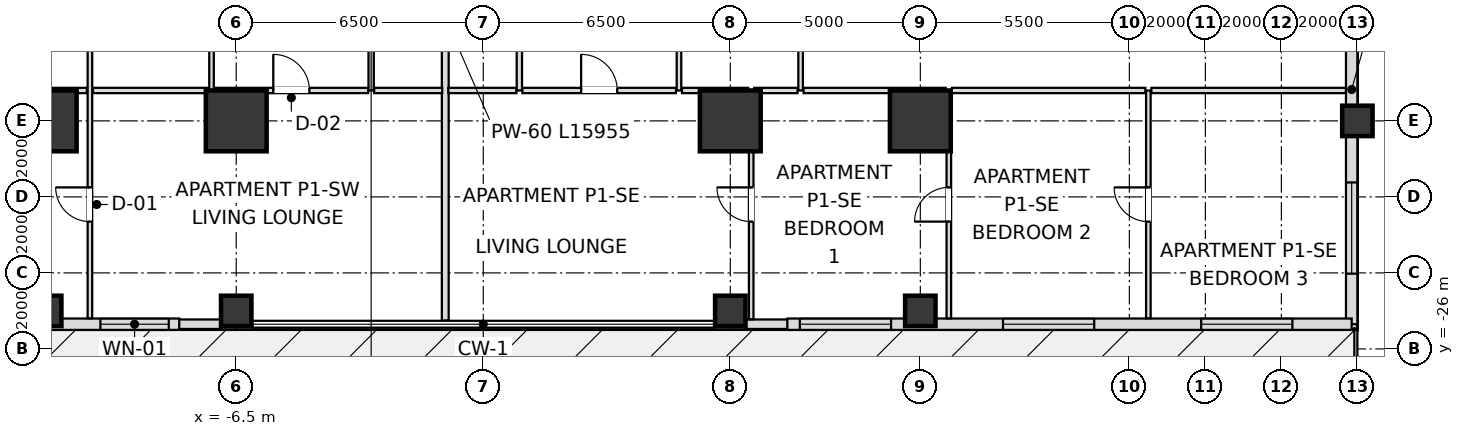
"""IFC4 building model, lengths in metres.
Left out: names, types, materials, properties, quantities, classifications, styles, units other than length and angle.
Written with IfcOpenShell. Run it as: python <this file> out.ifc"""

import sys

from ifc_helpers import new_model, si_unit, direction, frame, frame_2d, origin, origin_2d, place, context, subcontext, project, spatial, rectangle, extrude, element, fill, save


model = new_model("IFC4")
c1 = context("Model", 3, precision=1e-05, world=origin(), true_north=direction((0.0, 1.0)))
c2 = subcontext(c1, "Body", "Model", "MODEL_VIEW")
j1 = project(units=[si_unit("LENGTHUNIT", "METRE"), si_unit("PLANEANGLEUNIT", "RADIAN")], contexts=[c1])
p1 = place(None, origin())
s1 = spatial("IfcSite", under=j1, at=p1, CompositionType="ELEMENT")
p2 = place(p1, origin())
s2 = spatial("IfcBuilding", under=s1, at=p2, CompositionType="ELEMENT")
p3 = place(p2, frame((0.0, 0.0, 6.0)))
s3 = spatial("IfcBuildingStorey", under=s2, at=p3, CompositionType="ELEMENT", Elevation=6.0)
for number, where, z_axis, x_axis in (
    (1, (-11.5, -20.0, 0.0), (0.0, 0.0, 1.0), (1.0, 0.0, 0.0)),
    (2, (-6.5, -20.0, 0.0), (0.0, 0.0, 1.0), (1.0, 0.0, 0.0)),
    (3, (6.5, -20.0, 0.0), (0.0, 0.0, 1.0), (1.0, 0.0, 0.0)),
    (4, (11.5, -20.0, 0.0), (0.0, 0.0, 1.0), (1.0, 0.0, 0.0)),
):
    element("IfcColumn", number, at=place(p3, frame(where, z_axis=z_axis, x_axis=x_axis)), inside=s3, PredefinedType="USERDEFINED", context=c2, shape_type="SweptSolid", body=[
        extrude(rectangle(XDim=1.6, YDim=1.6, at=origin_2d()), origin(), (0.0, 0.0, 1.0), 5.4),
    ])
for number, where, z_axis, x_axis in (
    (5, (23.0, -20.0, 0.0), (0.0, 0.0, 1.0), (1.0, 0.0, 0.0)),
    (6, (-11.5, -25.0, 0.0), (0.0, 0.0, 1.0), (1.0, 0.0, 0.0)),
    (7, (-6.5, -25.0, 0.0), (0.0, 0.0, 1.0), (1.0, 0.0, 0.0)),
    (8, (6.5, -25.0, 0.0), (0.0, 0.0, 1.0), (1.0, 0.0, 0.0)),
    (9, (11.5, -25.0, 0.0), (0.0, 0.0, 1.0), (1.0, 0.0, 0.0)),
):
    element("IfcColumn", number, at=place(p3, frame(where, z_axis=z_axis, x_axis=x_axis)), inside=s3, PredefinedType="COLUMN", context=c2, shape_type="SweptSolid", body=[
        extrude(rectangle(XDim=0.8, YDim=0.8, at=origin_2d()), origin(), (0.0, 0.0, 1.0), 5.4),
    ])
p4 = place(p3, frame((22.85, -13.0, 0.0), z_axis=(0.0, 0.0, 1.0), x_axis=(0.0, -1.0, 0.0)))
e10 = element("IfcWall", 10, at=p4, inside=s3, PredefinedType="SOLIDWALL", context=c2, shape_type="SweptSolid", body=[
    extrude(rectangle(XDim=12.35, YDim=0.3, at=frame_2d((6.175, 0.0))), origin(), (0.0, 0.0, 1.0), 4.476),
])
p5 = place(p4, frame((2.12, 0.0, 0.8)))
e11 = element("IfcOpeningElement", 11, at=p5, cuts=e10, PredefinedType="OPENING", context=c2, shape_type="SweptSolid", body=[
    extrude(rectangle(XDim=2.4, YDim=2.2, at=frame_2d((1.2, 1.1))), frame((0.0, 0.16, 0.0), z_axis=(0.0, -1.0, 0.0), x_axis=(1.0, 0.0, 0.0)), (0.0, 0.0, 1.0), 0.32),
])
p6 = place(p4, frame((8.62, 0.0, 0.8)))
e12 = element("IfcOpeningElement", 12, at=p6, cuts=e10, PredefinedType="OPENING", context=c2, shape_type="SweptSolid", body=[
    extrude(rectangle(XDim=2.4, YDim=2.2, at=frame_2d((1.2, 1.1))), frame((0.0, 0.16, 0.0), z_axis=(0.0, -1.0, 0.0), x_axis=(1.0, 0.0, 0.0)), (0.0, 0.0, 1.0), 0.32),
])
for number, where, z_axis, x_axis in (
    (13, (-8.025, -25.35, 0.0), (0.0, 0.0, 1.0), (1.0, 0.0, 0.0)),
    (14, (6.895, -25.35, 0.0), (0.0, 0.0, 1.0), (1.0, 0.0, 0.0)),
):
    element("IfcWall", number, at=place(p3, frame(where, z_axis=z_axis, x_axis=x_axis)), inside=s3, PredefinedType="SOLIDWALL", context=c2, shape_type="SweptSolid", body=[
        extrude(rectangle(XDim=1.13, YDim=0.25, at=frame_2d((0.565, 0.0))), origin(), (0.0, 0.0, 1.0), 4.476),
    ])
p7 = place(p3, frame((-8.0, -25.35, 0.0), z_axis=(0.0, 0.0, 1.0), x_axis=(-1.0, 0.0, 0.0)))
e15 = element("IfcWall", 15, at=p7, inside=s3, PredefinedType="SOLIDWALL", context=c2, shape_type="SweptSolid", body=[
    extrude(rectangle(XDim=14.85, YDim=0.3, at=frame_2d((7.425, 0.0))), origin(), (0.0, 0.0, 1.0), 4.476),
])
p8 = place(p7, frame((6.8, 0.0, 0.0)))
e16 = element("IfcOpeningElement", 16, at=p8, cuts=e15, PredefinedType="OPENING", context=c2, shape_type="SweptSolid", body=[
    extrude(rectangle(XDim=1.8, YDim=2.3, at=frame_2d((0.9, 1.15))), frame((0.0, 0.16, 0.0), z_axis=(0.0, -1.0, 0.0), x_axis=(1.0, 0.0, 0.0)), (0.0, 0.0, 1.0), 0.32),
])
p9 = place(p7, frame((0.275, 0.0, 0.72)))
e17 = element("IfcOpeningElement", 17, at=p9, cuts=e15, PredefinedType="OPENING", context=c2, shape_type="SweptSolid", body=[
    extrude(rectangle(XDim=1.8, YDim=1.68, at=frame_2d((0.9, 0.84))), frame((0.0, 0.16, 0.0), z_axis=(0.0, -1.0, 0.0), x_axis=(1.0, 0.0, 0.0)), (0.0, 0.0, 1.0), 0.32),
])
p10 = place(p7, frame((4.305, 0.0, 0.72)))
e18 = element("IfcOpeningElement", 18, at=p10, cuts=e15, PredefinedType="OPENING", context=c2, shape_type="SweptSolid", body=[
    extrude(rectangle(XDim=1.8, YDim=1.68, at=frame_2d((0.9, 0.84))), frame((0.0, 0.16, 0.0), z_axis=(0.0, -1.0, 0.0), x_axis=(1.0, 0.0, 0.0)), (0.0, 0.0, 1.0), 0.32),
])
p11 = place(p7, frame((9.065, 0.0, 0.72)))
e19 = element("IfcOpeningElement", 19, at=p11, cuts=e15, PredefinedType="OPENING", context=c2, shape_type="SweptSolid", body=[
    extrude(rectangle(XDim=1.2, YDim=1.68, at=frame_2d((0.6, 0.84))), frame((0.0, 0.16, 0.0), z_axis=(0.0, -1.0, 0.0), x_axis=(1.0, 0.0, 0.0)), (0.0, 0.0, 1.0), 0.32),
])
p12 = place(p7, frame((11.445, 0.0, 0.8)))
e20 = element("IfcOpeningElement", 20, at=p12, cuts=e15, PredefinedType="OPENING", context=c2, shape_type="SweptSolid", body=[
    extrude(rectangle(XDim=2.4, YDim=2.2, at=frame_2d((1.2, 1.1))), frame((0.0, 0.16, 0.0), z_axis=(0.0, -1.0, 0.0), x_axis=(1.0, 0.0, 0.0)), (0.0, 0.0, 1.0), 0.32),
])
p13 = place(p3, frame((22.85, -25.35, 0.0), z_axis=(0.0, 0.0, 1.0), x_axis=(-1.0, 0.0, 0.0)))
e21 = element("IfcWall", 21, at=p13, inside=s3, PredefinedType="SOLIDWALL", context=c2, shape_type="SweptSolid", body=[
    extrude(rectangle(XDim=14.85, YDim=0.3, at=frame_2d((7.425, 0.0))), origin(), (0.0, 0.0, 1.0), 4.476),
])
p14 = place(p13, frame((1.56, 0.0, 0.8)))
e22 = element("IfcOpeningElement", 22, at=p14, cuts=e21, PredefinedType="OPENING", context=c2, shape_type="SweptSolid", body=[
    extrude(rectangle(XDim=2.4, YDim=2.2, at=frame_2d((1.2, 1.1))), frame((0.0, 0.16, 0.0), z_axis=(0.0, -1.0, 0.0), x_axis=(1.0, 0.0, 0.0)), (0.0, 0.0, 1.0), 0.32),
])
p15 = place(p13, frame((6.775, 0.0, 0.8)))
e23 = element("IfcOpeningElement", 23, at=p15, cuts=e21, PredefinedType="OPENING", context=c2, shape_type="SweptSolid", body=[
    extrude(rectangle(XDim=2.4, YDim=2.2, at=frame_2d((1.2, 1.1))), frame((0.0, 0.16, 0.0), z_axis=(0.0, -1.0, 0.0), x_axis=(1.0, 0.0, 0.0)), (0.0, 0.0, 1.0), 0.32),
])
p16 = place(p13, frame((12.12, 0.0, 0.8)))
e24 = element("IfcOpeningElement", 24, at=p16, cuts=e21, PredefinedType="OPENING", context=c2, shape_type="SweptSolid", body=[
    extrude(rectangle(XDim=2.4, YDim=2.2, at=frame_2d((1.2, 1.1))), frame((0.0, 0.16, 0.0), z_axis=(0.0, -1.0, 0.0), x_axis=(1.0, 0.0, 0.0)), (0.0, 0.0, 1.0), 0.32),
])
p17 = place(p3, frame((-10.35, -25.195, 0.0), z_axis=(0.0, 0.0, 1.0), x_axis=(0.0, 1.0, 0.0)))
e25 = element("IfcWall", 25, at=p17, inside=s3, PredefinedType="PARTITIONING", context=c2, shape_type="SweptSolid", body=[
    extrude(rectangle(XDim=15.895, YDim=0.12, at=frame_2d((7.948, 0.0))), origin(), (0.0, 0.0, 1.0), 4.41),
])
p18 = place(p17, frame((10.495, 0.0, 0.0)))
e26 = element("IfcOpeningElement", 26, at=p18, cuts=e25, PredefinedType="OPENING", context=c2, shape_type="SweptSolid", body=[
    extrude(rectangle(XDim=0.9, YDim=2.1, at=frame_2d((0.45, 1.05))), frame((0.0, 0.07, 0.0), z_axis=(0.0, -1.0, 0.0), x_axis=(1.0, 0.0, 0.0)), (0.0, 0.0, 1.0), 0.14),
])
p19 = place(p17, frame((2.545, 0.0, 0.0)))
e27 = element("IfcOpeningElement", 27, at=p19, cuts=e25, PredefinedType="OPENING", context=c2, shape_type="SweptSolid", body=[
    extrude(rectangle(XDim=0.9, YDim=2.1, at=frame_2d((0.45, 1.05))), frame((0.0, 0.07, 0.0), z_axis=(0.0, -1.0, 0.0), x_axis=(1.0, 0.0, 0.0)), (0.0, 0.0, 1.0), 0.14),
])
p20 = place(p3, frame((-7.15, -19.2, 0.0), z_axis=(0.0, 0.0, 1.0), x_axis=(0.0, 1.0, 0.0)))
e28 = element("IfcWall", 28, at=p20, inside=s3, PredefinedType="PARTITIONING", context=c2, shape_type="SweptSolid", body=[
    extrude(rectangle(XDim=9.9, YDim=0.12, at=frame_2d((4.95, 0.0))), origin(), (0.0, 0.0, 1.0), 4.41),
])
p21 = place(p20, frame((4.475, 0.0, 0.0)))
e29 = element("IfcOpeningElement", 29, at=p21, cuts=e28, PredefinedType="OPENING", context=c2, shape_type="SweptSolid", body=[
    extrude(rectangle(XDim=0.95, YDim=2.1, at=frame_2d((0.475, 1.05))), frame((0.0, 0.07, 0.0), z_axis=(0.0, -1.0, 0.0), x_axis=(1.0, 0.0, 0.0)), (0.0, 0.0, 1.0), 0.14),
])
p22 = place(p3, frame((-2.95, -19.2, 0.0), z_axis=(0.0, 0.0, 1.0), x_axis=(0.0, 1.0, 0.0)))
e30 = element("IfcWall", 30, at=p22, inside=s3, PredefinedType="PARTITIONING", context=c2, shape_type="SweptSolid", body=[
    extrude(rectangle(XDim=9.9, YDim=0.14, at=frame_2d((4.95, 0.0))), origin(), (0.0, 0.0, 1.0), 4.642),
])
p23 = place(p22, frame((4.5, 0.0, 0.0)))
e31 = element("IfcOpeningElement", 31, at=p23, cuts=e30, PredefinedType="OPENING", context=c2, shape_type="SweptSolid", body=[
    extrude(rectangle(XDim=0.9, YDim=2.1, at=frame_2d((0.45, 1.05))), frame((0.0, 0.08, 0.0), z_axis=(0.0, -1.0, 0.0), x_axis=(1.0, 0.0, 0.0)), (0.0, 0.0, 1.0), 0.16),
])
p24 = place(p3, frame((-1.0, -25.255, 0.0), z_axis=(0.0, 0.0, 1.0), x_axis=(0.0, 1.0, 0.0)))
e32 = element("IfcWall", 32, at=p24, inside=s3, PredefinedType="PARTITIONING", context=c2, shape_type="SweptSolid", body=[
    extrude(rectangle(XDim=15.955, YDim=0.18, at=frame_2d((7.978, 0.0))), origin(), (0.0, 0.0, 1.0), 4.476),
])
p25 = place(p3, frame((0.95, -19.2, 0.0), z_axis=(0.0, 0.0, 1.0), x_axis=(0.0, 1.0, 0.0)))
e33 = element("IfcWall", 33, at=p25, inside=s3, PredefinedType="PARTITIONING", context=c2, shape_type="SweptSolid", body=[
    extrude(rectangle(XDim=9.9, YDim=0.14, at=frame_2d((4.95, 0.0))), origin(), (0.0, 0.0, 1.0), 4.642),
])
p26 = place(p25, frame((4.5, 0.0, 0.0)))
e34 = element("IfcOpeningElement", 34, at=p26, cuts=e33, PredefinedType="OPENING", context=c2, shape_type="SweptSolid", body=[
    extrude(rectangle(XDim=0.9, YDim=2.1, at=frame_2d((0.45, 1.05))), frame((0.0, 0.08, 0.0), z_axis=(0.0, -1.0, 0.0), x_axis=(1.0, 0.0, 0.0)), (0.0, 0.0, 1.0), 0.16),
])
p27 = place(p3, frame((5.15, -19.2, 0.0), z_axis=(0.0, 0.0, 1.0), x_axis=(0.0, 1.0, 0.0)))
e35 = element("IfcWall", 35, at=p27, inside=s3, PredefinedType="PARTITIONING", context=c2, shape_type="SweptSolid", body=[
    extrude(rectangle(XDim=9.9, YDim=0.12, at=frame_2d((4.95, 0.0))), origin(), (0.0, 0.0, 1.0), 4.642),
])
p28 = place(p27, frame((4.475, 0.0, 0.0)))
e36 = element("IfcOpeningElement", 36, at=p28, cuts=e35, PredefinedType="OPENING", context=c2, shape_type="SweptSolid", body=[
    extrude(rectangle(XDim=0.95, YDim=2.1, at=frame_2d((0.475, 1.05))), frame((0.0, 0.07, 0.0), z_axis=(0.0, -1.0, 0.0), x_axis=(1.0, 0.0, 0.0)), (0.0, 0.0, 1.0), 0.14),
])
p29 = place(p3, frame((7.05, -25.22, 0.0), z_axis=(0.0, 0.0, 1.0), x_axis=(0.0, 1.0, 0.0)))
e37 = element("IfcWall", 37, at=p29, inside=s3, PredefinedType="PARTITIONING", context=c2, shape_type="SweptSolid", body=[
    extrude(rectangle(XDim=6.02, YDim=0.12, at=frame_2d((3.01, 0.0))), origin(), (0.0, 0.0, 1.0), 4.476),
])
p30 = place(p29, frame((2.57, 0.0, 0.0)))
e38 = element("IfcOpeningElement", 38, at=p30, cuts=e37, PredefinedType="OPENING", context=c2, shape_type="SweptSolid", body=[
    extrude(rectangle(XDim=0.9, YDim=2.1, at=frame_2d((0.45, 1.05))), frame((0.0, 0.07, 0.0), z_axis=(0.0, -1.0, 0.0), x_axis=(1.0, 0.0, 0.0)), (0.0, 0.0, 1.0), 0.14),
])
p31 = place(p3, frame((8.35, -19.2, 0.0), z_axis=(0.0, 0.0, 1.0), x_axis=(0.0, 1.0, 0.0)))
e39 = element("IfcWall", 39, at=p31, inside=s3, PredefinedType="PARTITIONING", context=c2, shape_type="SweptSolid", body=[
    extrude(rectangle(XDim=9.9, YDim=0.12, at=frame_2d((4.95, 0.0))), origin(), (0.0, 0.0, 1.0), 4.41),
])
p32 = place(p31, frame((4.475, 0.0, 0.0)))
e40 = element("IfcOpeningElement", 40, at=p32, cuts=e39, PredefinedType="OPENING", context=c2, shape_type="SweptSolid", body=[
    extrude(rectangle(XDim=0.95, YDim=2.1, at=frame_2d((0.475, 1.05))), frame((0.0, 0.07, 0.0), z_axis=(0.0, -1.0, 0.0), x_axis=(1.0, 0.0, 0.0)), (0.0, 0.0, 1.0), 0.14),
])
p33 = place(p3, frame((12.25, -25.195, 0.0), z_axis=(0.0, 0.0, 1.0), x_axis=(0.0, 1.0, 0.0)))
e41 = element("IfcWall", 41, at=p33, inside=s3, PredefinedType="PARTITIONING", context=c2, shape_type="SweptSolid", body=[
    extrude(rectangle(XDim=5.995, YDim=0.12, at=frame_2d((2.998, 0.0))), origin(), (0.0, 0.0, 1.0), 4.476),
])
p34 = place(p33, frame((2.545, 0.0, 0.0)))
e42 = element("IfcOpeningElement", 42, at=p34, cuts=e41, PredefinedType="OPENING", context=c2, shape_type="SweptSolid", body=[
    extrude(rectangle(XDim=0.9, YDim=2.1, at=frame_2d((0.45, 1.05))), frame((0.0, 0.07, 0.0), z_axis=(0.0, -1.0, 0.0), x_axis=(1.0, 0.0, 0.0)), (0.0, 0.0, 1.0), 0.14),
])
p35 = place(p3, frame((17.5, -25.195, 0.0), z_axis=(0.0, 0.0, 1.0), x_axis=(0.0, 1.0, 0.0)))
e43 = element("IfcWall", 43, at=p35, inside=s3, PredefinedType="PARTITIONING", context=c2, shape_type="SweptSolid", body=[
    extrude(rectangle(XDim=5.995, YDim=0.12, at=frame_2d((2.998, 0.0))), origin(), (0.0, 0.0, 1.0), 4.476),
])
p36 = place(p35, frame((2.545, 0.0, 0.0)))
e44 = element("IfcOpeningElement", 44, at=p36, cuts=e43, PredefinedType="OPENING", context=c2, shape_type="SweptSolid", body=[
    extrude(rectangle(XDim=0.9, YDim=2.1, at=frame_2d((0.45, 1.05))), frame((0.0, 0.07, 0.0), z_axis=(0.0, -1.0, 0.0), x_axis=(1.0, 0.0, 0.0)), (0.0, 0.0, 1.0), 0.14),
])
p37 = place(p3, frame((-14.37, -19.2, 0.0), z_axis=(0.0, 0.0, 1.0), x_axis=(1.0, 0.0, 0.0)))
e45 = element("IfcWall", 45, at=p37, inside=s3, PredefinedType="PARTITIONING", context=c2, shape_type="SweptSolid", body=[
    extrude(rectangle(XDim=3.94, YDim=0.14, at=frame_2d((1.97, 0.0))), origin(), (0.0, 0.0, 1.0), 5.12),
])
p38 = place(p3, frame((-10.27, -19.2, 0.0), z_axis=(0.0, 0.0, 1.0), x_axis=(1.0, 0.0, 0.0)))
e46 = element("IfcWall", 46, at=p38, inside=s3, PredefinedType="PARTITIONING", context=c2, shape_type="SweptSolid", body=[
    extrude(rectangle(XDim=3.04, YDim=0.14, at=frame_2d((1.52, 0.0))), origin(), (0.0, 0.0, 1.0), 5.12),
])
p39 = place(p3, frame((-7.07, -19.2, 0.0), z_axis=(0.0, 0.0, 1.0), x_axis=(1.0, 0.0, 0.0)))
e47 = element("IfcWall", 47, at=p39, inside=s3, PredefinedType="PARTITIONING", context=c2, shape_type="SweptSolid", body=[
    extrude(rectangle(XDim=4.04, YDim=0.14, at=frame_2d((2.02, 0.0))), origin(), (0.0, 0.0, 1.0), 4.41),
])
p40 = place(p39, frame((1.545, 0.0, 0.0)))
e48 = element("IfcOpeningElement", 48, at=p40, cuts=e47, PredefinedType="OPENING", context=c2, shape_type="SweptSolid", body=[
    extrude(rectangle(XDim=0.95, YDim=2.1, at=frame_2d((0.475, 1.05))), frame((0.0, 0.08, 0.0), z_axis=(0.0, -1.0, 0.0), x_axis=(1.0, 0.0, 0.0)), (0.0, 0.0, 1.0), 0.16),
])
for number, where, z_axis, x_axis in (
    (49, (-2.87, -19.2, 0.0), (0.0, 0.0, 1.0), (1.0, 0.0, 0.0)),
    (50, (-0.92, -19.2, 0.0), (0.0, 0.0, 1.0), (1.0, 0.0, 0.0)),
):
    element("IfcWall", number, at=place(p3, frame(where, z_axis=z_axis, x_axis=x_axis)), inside=s3, PredefinedType="PARTITIONING", context=c2, shape_type="SweptSolid", body=[
        extrude(rectangle(XDim=1.79, YDim=0.14, at=frame_2d((0.895, 0.0))), origin(), (0.0, 0.0, 1.0), 5.12),
    ])
p41 = place(p3, frame((1.03, -19.2, 0.0), z_axis=(0.0, 0.0, 1.0), x_axis=(1.0, 0.0, 0.0)))
e51 = element("IfcWall", 51, at=p41, inside=s3, PredefinedType="PARTITIONING", context=c2, shape_type="SweptSolid", body=[
    extrude(rectangle(XDim=4.04, YDim=0.14, at=frame_2d((2.02, 0.0))), origin(), (0.0, 0.0, 1.0), 5.12),
])
p42 = place(p41, frame((1.545, 0.0, 0.0)))
e52 = element("IfcOpeningElement", 52, at=p42, cuts=e51, PredefinedType="OPENING", context=c2, shape_type="SweptSolid", body=[
    extrude(rectangle(XDim=0.95, YDim=2.1, at=frame_2d((0.475, 1.05))), frame((0.0, 0.08, 0.0), z_axis=(0.0, -1.0, 0.0), x_axis=(1.0, 0.0, 0.0)), (0.0, 0.0, 1.0), 0.16),
])
p43 = place(p3, frame((5.23, -19.2, 0.0), z_axis=(0.0, 0.0, 1.0), x_axis=(1.0, 0.0, 0.0)))
e53 = element("IfcWall", 53, at=p43, inside=s3, PredefinedType="PARTITIONING", context=c2, shape_type="SweptSolid", body=[
    extrude(rectangle(XDim=1.74, YDim=0.14, at=frame_2d((0.87, 0.0))), origin(), (0.0, 0.0, 1.0), 4.41),
])
p44 = place(p3, frame((7.13, -19.2, 0.0), z_axis=(0.0, 0.0, 1.0), x_axis=(1.0, 0.0, 0.0)))
e54 = element("IfcWall", 54, at=p44, inside=s3, PredefinedType="PARTITIONING", context=c2, shape_type="SweptSolid", body=[
    extrude(rectangle(XDim=1.14, YDim=0.14, at=frame_2d((0.57, 0.0))), origin(), (0.0, 0.0, 1.0), 5.12),
])
p45 = place(p3, frame((8.43, -19.2, 0.0), z_axis=(0.0, 0.0, 1.0), x_axis=(1.0, 0.0, 0.0)))
e55 = element("IfcWall", 55, at=p45, inside=s3, PredefinedType="PARTITIONING", context=c2, shape_type="SweptSolid", body=[
    extrude(rectangle(XDim=3.74, YDim=0.14, at=frame_2d((1.87, 0.0))), origin(), (0.0, 0.0, 1.0), 5.12),
])
p46 = place(p3, frame((12.33, -19.2, 0.0), z_axis=(0.0, 0.0, 1.0), x_axis=(1.0, 0.0, 0.0)))
e56 = element("IfcWall", 56, at=p46, inside=s3, PredefinedType="PARTITIONING", context=c2, shape_type="SweptSolid", body=[
    extrude(rectangle(XDim=5.09, YDim=0.14, at=frame_2d((2.545, 0.0))), origin(), (0.0, 0.0, 1.0), 5.12),
])
p47 = place(p3, frame((17.58, -19.2, 0.0), z_axis=(0.0, 0.0, 1.0), x_axis=(1.0, 0.0, 0.0)))
e57 = element("IfcWall", 57, at=p47, inside=s3, PredefinedType="PARTITIONING", context=c2, shape_type="SweptSolid", body=[
    extrude(rectangle(XDim=5.115, YDim=0.14, at=frame_2d((2.558, 0.0))), origin(), (0.0, 0.0, 1.0), 5.12),
])
p48 = place(p6, origin())
e58 = element("IfcWindow", 58, at=p48, inside=s3, PartitioningType="SINGLE_PANEL", PredefinedType="WINDOW", context=c2, shape_type="SweptSolid", body=[
    extrude(rectangle(XDim=2.4, YDim=2.2, at=frame_2d((1.2, 1.1))), frame((0.0, 0.03, 0.0), z_axis=(0.0, -1.0, 0.0), x_axis=(1.0, 0.0, 0.0)), (0.0, 0.0, 1.0), 0.06),
])
fill(e12, e58)
p49 = place(p9, origin())
e59 = element("IfcWindow", 59, at=p49, inside=s3, PartitioningType="SINGLE_PANEL", PredefinedType="WINDOW", context=c2, shape_type="SweptSolid", body=[
    extrude(rectangle(XDim=1.8, YDim=1.68, at=frame_2d((0.9, 0.84))), frame((0.0, 0.03, 0.0), z_axis=(0.0, -1.0, 0.0), x_axis=(1.0, 0.0, 0.0)), (0.0, 0.0, 1.0), 0.06),
])
fill(e17, e59)
p50 = place(p14, origin())
e60 = element("IfcWindow", 60, at=p50, inside=s3, PartitioningType="SINGLE_PANEL", PredefinedType="WINDOW", context=c2, shape_type="SweptSolid", body=[
    extrude(rectangle(XDim=2.4, YDim=2.2, at=frame_2d((1.2, 1.1))), frame((0.0, 0.03, 0.0), z_axis=(0.0, -1.0, 0.0), x_axis=(1.0, 0.0, 0.0)), (0.0, 0.0, 1.0), 0.06),
])
fill(e22, e60)
p51 = place(p15, origin())
e61 = element("IfcWindow", 61, at=p51, inside=s3, PartitioningType="SINGLE_PANEL", PredefinedType="WINDOW", context=c2, shape_type="SweptSolid", body=[
    extrude(rectangle(XDim=2.4, YDim=2.2, at=frame_2d((1.2, 1.1))), frame((0.0, 0.03, 0.0), z_axis=(0.0, -1.0, 0.0), x_axis=(1.0, 0.0, 0.0)), (0.0, 0.0, 1.0), 0.06),
])
fill(e23, e61)
p52 = place(p16, origin())
e62 = element("IfcWindow", 62, at=p52, inside=s3, PartitioningType="SINGLE_PANEL", PredefinedType="WINDOW", context=c2, shape_type="SweptSolid", body=[
    extrude(rectangle(XDim=2.4, YDim=2.2, at=frame_2d((1.2, 1.1))), frame((0.0, 0.03, 0.0), z_axis=(0.0, -1.0, 0.0), x_axis=(1.0, 0.0, 0.0)), (0.0, 0.0, 1.0), 0.06),
])
fill(e24, e62)
p53 = place(p40, origin())
e63 = element("IfcDoor", 63, at=p53, inside=s3, OperationType="SINGLE_SWING_LEFT", PredefinedType="DOOR", context=c2, shape_type="SweptSolid", body=[
    extrude(rectangle(XDim=0.95, YDim=2.1, at=frame_2d((0.475, 1.05))), frame((0.0, 0.025, 0.0), z_axis=(0.0, -1.0, 0.0), x_axis=(1.0, 0.0, 0.0)), (0.0, 0.0, 1.0), 0.05),
])
fill(e48, e63)
p54 = place(p19, origin())
e64 = element("IfcDoor", 64, at=p54, inside=s3, OperationType="SINGLE_SWING_RIGHT", PredefinedType="DOOR", context=c2, shape_type="SweptSolid", body=[
    extrude(rectangle(XDim=0.9, YDim=2.1, at=frame_2d((0.45, 1.05))), frame((0.0, 0.025, 0.0), z_axis=(0.0, -1.0, 0.0), x_axis=(1.0, 0.0, 0.0)), (0.0, 0.0, 1.0), 0.05),
])
fill(e27, e64)
p55 = place(p42, origin())
e65 = element("IfcDoor", 65, at=p55, inside=s3, OperationType="SINGLE_SWING_LEFT", PredefinedType="DOOR", context=c2, shape_type="SweptSolid", body=[
    extrude(rectangle(XDim=0.95, YDim=2.1, at=frame_2d((0.475, 1.05))), frame((0.0, 0.025, 0.0), z_axis=(0.0, -1.0, 0.0), x_axis=(1.0, 0.0, 0.0)), (0.0, 0.0, 1.0), 0.05),
])
fill(e52, e65)
p56 = place(p30, origin())
e66 = element("IfcDoor", 66, at=p56, inside=s3, OperationType="SINGLE_SWING_RIGHT", PredefinedType="DOOR", context=c2, shape_type="SweptSolid", body=[
    extrude(rectangle(XDim=0.9, YDim=2.1, at=frame_2d((0.45, 1.05))), frame((0.0, 0.025, 0.0), z_axis=(0.0, -1.0, 0.0), x_axis=(1.0, 0.0, 0.0)), (0.0, 0.0, 1.0), 0.05),
])
fill(e38, e66)
p57 = place(p34, origin())
e67 = element("IfcDoor", 67, at=p57, inside=s3, OperationType="SINGLE_SWING_LEFT", PredefinedType="DOOR", context=c2, shape_type="SweptSolid", body=[
    extrude(rectangle(XDim=0.9, YDim=2.1, at=frame_2d((0.45, 1.05))), frame((0.0, 0.025, 0.0), z_axis=(0.0, -1.0, 0.0), x_axis=(1.0, 0.0, 0.0)), (0.0, 0.0, 1.0), 0.05),
])
fill(e42, e67)
p58 = place(p36, origin())
e68 = element("IfcDoor", 68, at=p58, inside=s3, OperationType="SINGLE_SWING_RIGHT", PredefinedType="DOOR", context=c2, shape_type="SweptSolid", body=[
    extrude(rectangle(XDim=0.9, YDim=2.1, at=frame_2d((0.45, 1.05))), frame((0.0, 0.025, 0.0), z_axis=(0.0, -1.0, 0.0), x_axis=(1.0, 0.0, 0.0)), (0.0, 0.0, 1.0), 0.05),
])
fill(e44, e68)
save(model, sys.argv[1])
